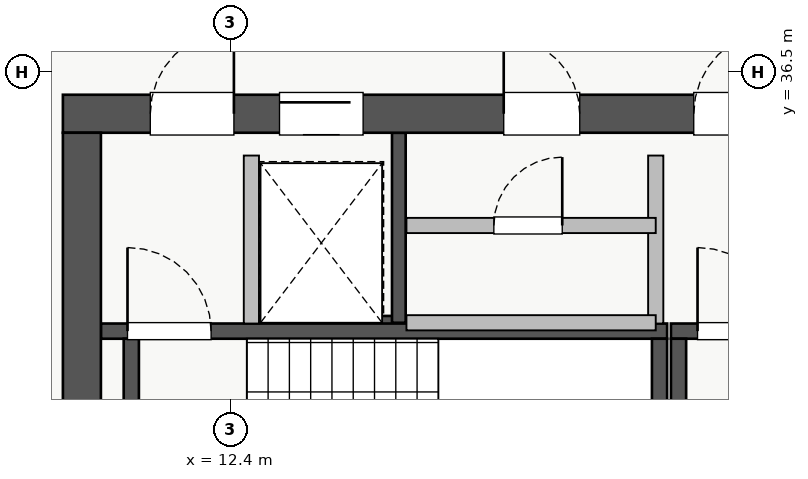
"""IFC4 building model, lengths in metres.
Left out: names, types, materials, properties, quantities, classifications, styles, units other than length and angle.
Written with IfcOpenShell. Run it as: python <this file> out.ifc"""

import sys

from ifc_helpers import new_model, si_unit, direction, frame, frame_2d, origin, place, context, subcontext, project, spatial, rectangle, extrude, source, transform, mapped, element, fill, save


model = new_model("IFC4")
c1 = context("Model", 3, precision=1e-05, world=origin(), true_north=direction((0.0, 1.0)))
c2 = subcontext(c1, "Body", "Model", "MODEL_VIEW")
j1 = project(units=[si_unit("LENGTHUNIT", "METRE"), si_unit("PLANEANGLEUNIT", "RADIAN")], contexts=[c1])
p1 = place(None, origin())
s1 = spatial("IfcSite", under=j1, at=p1, CompositionType="ELEMENT")
p2 = place(p1, origin())
s2 = spatial("IfcBuilding", under=s1, at=p2, CompositionType="ELEMENT")
p3 = place(p2, frame((0.0, 0.0, 240.5)))
s3 = spatial("IfcBuildingStorey", under=s2, at=p3, CompositionType="ELEMENT", Elevation=240.5)
p4 = place(p3, frame((12.68, 33.2, 0.0), z_axis=(0.0, 0.0, 1.0), x_axis=(1.0, 0.0, 0.0)))
e1 = element("IfcWall", 1, at=p4, inside=s3, PredefinedType="SHEAR", context=c2, shape_type="SweptSolid", body=[
    extrude(rectangle(XDim=1.94, YDim=0.18, at=frame_2d((0.97, 0.0))), origin(), (0.0, 0.0, 1.0), 3.07),
])
p5 = place(p3, frame((14.62, 33.2, 0.0), z_axis=(0.0, 0.0, 1.0), x_axis=(0.0, 1.0, 0.0)))
e2 = element("IfcWall", 2, at=p5, inside=s3, PredefinedType="SHEAR", context=c2, shape_type="SweptSolid", body=[
    extrude(rectangle(XDim=2.5, YDim=0.18, at=frame_2d((1.25, 0.0))), origin(), (0.0, 0.0, 1.0), 3.07),
])
p6 = place(p3, frame((10.7, 33.09, 0.0), z_axis=(0.0, 0.0, 1.0), x_axis=(1.0, 0.0, 0.0)))
e3 = element("IfcWall", 3, at=p6, inside=s3, PredefinedType="SHEAR", context=c2, shape_type="SweptSolid", body=[
    extrude(rectangle(XDim=7.45, YDim=0.2, at=frame_2d((3.725, 0.0))), origin(), (0.0, 0.0, 1.0), 3.25),
])
p7 = place(p6, frame((0.35, 0.0, 0.0)))
e4 = element("IfcOpeningElement", 4, at=p7, cuts=e3, PredefinedType="OPENING", context=c2, shape_type="SweptSolid", body=[
    extrude(rectangle(XDim=1.1, YDim=2.05, at=frame_2d((0.55, 1.025))), frame((0.0, 0.11, 0.0), z_axis=(0.0, -1.0, 0.0), x_axis=(1.0, 0.0, 0.0)), (0.0, 0.0, 1.0), 0.22),
])
for number, where, z_axis, x_axis in (
    (5, (11.1, 30.05, 0.0), (0.0, 0.0, 1.0), (0.0, 1.0, 0.0)),
    (6, (18.05, 30.05, 0.0), (0.0, 0.0, 1.0), (0.0, 1.0, 0.0)),
):
    element("IfcWall", number, at=place(p3, frame(where, z_axis=z_axis, x_axis=x_axis)), inside=s3, PredefinedType="SHEAR", context=c2, shape_type="SweptSolid", body=[
        extrude(rectangle(XDim=2.94, YDim=0.2, at=frame_2d((1.47, 0.0))), origin(), (0.0, 0.0, 1.0), 3.25),
    ])
p8 = place(p3, frame((18.2, 33.09, 0.0), z_axis=(0.0, 0.0, 1.0), x_axis=(1.0, 0.0, 0.0)))
e7 = element("IfcWall", 7, at=p8, inside=s3, PredefinedType="SHEAR", context=c2, shape_type="SweptSolid", body=[
    extrude(rectangle(XDim=7.15, YDim=0.2, at=frame_2d((3.575, 0.0))), origin(), (0.0, 0.0, 1.0), 3.25),
])
p9 = place(p8, frame((0.35, 0.0, 0.0)))
e8 = element("IfcOpeningElement", 8, at=p9, cuts=e7, PredefinedType="OPENING", context=c2, shape_type="SweptSolid", body=[
    extrude(rectangle(XDim=1.1, YDim=2.05, at=frame_2d((0.55, 1.025))), frame((0.0, 0.11, 0.0), z_axis=(0.0, -1.0, 0.0), x_axis=(1.0, 0.0, 0.0)), (0.0, 0.0, 1.0), 0.22),
])
p10 = place(p3, frame((18.3, 30.05, 0.0), z_axis=(0.0, 0.0, 1.0), x_axis=(0.0, 1.0, 0.0)))
e9 = element("IfcWall", 9, at=p10, inside=s3, PredefinedType="SHEAR", context=c2, shape_type="SweptSolid", body=[
    extrude(rectangle(XDim=2.94, YDim=0.2, at=frame_2d((1.47, 0.0))), origin(), (0.0, 0.0, 1.0), 3.25),
])
p11 = place(p3, frame((10.2, 35.95, 0.0), z_axis=(0.0, 0.0, 1.0), x_axis=(1.0, 0.0, 0.0)))
e10 = element("IfcWall", 10, at=p11, inside=s3, PredefinedType="SHEAR", context=c2, shape_type="SweptSolid", body=[
    extrude(rectangle(XDim=17.6, YDim=0.5, at=frame_2d((8.8, 0.0))), origin(), (0.0, 0.0, 1.0), 3.25),
])
p12 = place(p11, frame((1.15, 0.0, 0.0)))
e11 = element("IfcOpeningElement", 11, at=p12, cuts=e10, PredefinedType="OPENING", context=c2, shape_type="SweptSolid", body=[
    extrude(rectangle(XDim=1.1, YDim=2.05, at=frame_2d((0.55, 1.025))), frame((0.0, 0.26, 0.0), z_axis=(0.0, -1.0, 0.0), x_axis=(1.0, 0.0, 0.0)), (0.0, 0.0, 1.0), 0.52),
])
p13 = place(p11, frame((8.3, 0.0, 0.0)))
e12 = element("IfcOpeningElement", 12, at=p13, cuts=e10, PredefinedType="OPENING", context=c2, shape_type="SweptSolid", body=[
    extrude(rectangle(XDim=1.1, YDim=2.05, at=frame_2d((0.55, 1.025))), frame((0.0, 0.26, 0.0), z_axis=(0.0, -1.0, 0.0), x_axis=(1.0, 0.0, 0.0)), (0.0, 0.0, 1.0), 0.52),
])
p14 = place(p11, frame((2.85, 0.0, 0.0)))
e13 = element("IfcOpeningElement", 13, at=p14, cuts=e10, PredefinedType="OPENING", context=c2, shape_type="SweptSolid", body=[
    extrude(rectangle(XDim=1.1, YDim=2.05, at=frame_2d((0.55, 1.025))), frame((0.0, 0.26, 0.0), z_axis=(0.0, -1.0, 0.0), x_axis=(1.0, 0.0, 0.0)), (0.0, 0.0, 1.0), 0.52),
])
p15 = place(p11, frame((5.8, 0.0, 0.0)))
e14 = element("IfcOpeningElement", 14, at=p15, cuts=e10, PredefinedType="OPENING", context=c2, shape_type="SweptSolid", body=[
    extrude(rectangle(XDim=1.0, YDim=2.05, at=frame_2d((0.5, 1.025))), frame((0.0, 0.26, 0.0), z_axis=(0.0, -1.0, 0.0), x_axis=(1.0, 0.0, 0.0)), (0.0, 0.0, 1.0), 0.52),
])
p16 = place(p11, frame((14.74, 0.0, 0.0)))
e15 = element("IfcOpeningElement", 15, at=p16, cuts=e10, PredefinedType="OPENING", context=c2, shape_type="SweptSolid", body=[
    extrude(rectangle(XDim=1.0, YDim=2.05, at=frame_2d((0.5, 1.025))), frame((0.0, 0.26, 0.0), z_axis=(0.0, -1.0, 0.0), x_axis=(1.0, 0.0, 0.0)), (0.0, 0.0, 1.0), 0.52),
])
p17 = place(p11, frame((10.25, 0.0, 0.0)))
e16 = element("IfcOpeningElement", 16, at=p17, cuts=e10, PredefinedType="OPENING", context=c2, shape_type="SweptSolid", body=[
    extrude(rectangle(XDim=1.0, YDim=2.05, at=frame_2d((0.5, 1.025))), frame((0.0, 0.26, 0.0), z_axis=(0.0, -1.0, 0.0), x_axis=(1.0, 0.0, 0.0)), (0.0, 0.0, 1.0), 0.52),
])
p18 = place(p11, frame((12.7, 0.0, 0.0)))
e17 = element("IfcOpeningElement", 17, at=p18, cuts=e10, PredefinedType="OPENING", context=c2, shape_type="SweptSolid", body=[
    extrude(rectangle(XDim=1.0, YDim=2.05, at=frame_2d((0.5, 1.025))), frame((0.0, 0.26, 0.0), z_axis=(0.0, -1.0, 0.0), x_axis=(1.0, 0.0, 0.0)), (0.0, 0.0, 1.0), 0.52),
])
p19 = place(p3, frame((10.45, 29.5, 0.0), z_axis=(0.0, 0.0, 1.0), x_axis=(0.0, 1.0, 0.0)))
e18 = element("IfcWall", 18, at=p19, inside=s3, PredefinedType="SHEAR", context=c2, shape_type="SweptSolid", body=[
    extrude(rectangle(XDim=6.2, YDim=0.5, at=frame_2d((3.1, 0.0))), origin(), (0.0, 0.0, 1.0), 3.25),
])
for number, where, z_axis, x_axis in (
    (19, (12.68, 33.19, 0.0), (0.0, 0.0, 1.0), (0.0, 1.0, 0.0)),
    (20, (18.0, 33.19, 0.0), (0.0, 0.0, 1.0), (0.0, 1.0, 0.0)),
):
    element("IfcWall", number, at=place(p3, frame(where, z_axis=z_axis, x_axis=x_axis)), inside=s3, PredefinedType="PARTITIONING", context=c2, shape_type="SweptSolid", body=[
        extrude(rectangle(XDim=2.21, YDim=0.2, at=frame_2d((1.105, 0.0))), origin(), (0.0, 0.0, 1.0), 3.07),
    ])
p20 = place(p3, frame((14.72, 34.48, 0.0), z_axis=(0.0, 0.0, 1.0), x_axis=(1.0, 0.0, 0.0)))
e21 = element("IfcWall", 21, at=p20, inside=s3, PredefinedType="PARTITIONING", context=c2, shape_type="SweptSolid", body=[
    extrude(rectangle(XDim=3.28, YDim=0.2, at=frame_2d((1.64, 0.0))), origin(), (0.0, 0.0, 1.0), 3.07),
])
p21 = place(p20, frame((1.15, 0.0, 0.0)))
e22 = element("IfcOpeningElement", 22, at=p21, cuts=e21, PredefinedType="OPENING", context=c2, shape_type="SweptSolid", body=[
    extrude(rectangle(XDim=0.9, YDim=2.05, at=frame_2d((0.45, 1.025))), frame((0.0, 0.11, 0.0), z_axis=(0.0, -1.0, 0.0), x_axis=(1.0, 0.0, 0.0)), (0.0, 0.0, 1.0), 0.22),
])
p22 = place(p3, frame((14.72, 33.2, 0.0), z_axis=(0.0, 0.0, 1.0), x_axis=(1.0, 0.0, 0.0)))
e23 = element("IfcWall", 23, at=p22, inside=s3, PredefinedType="PARTITIONING", context=c2, shape_type="SweptSolid", body=[
    extrude(rectangle(XDim=3.28, YDim=0.2, at=frame_2d((1.64, 0.0))), origin(), (0.0, 0.0, 1.0), 3.07),
])
m1 = source(origin(), c2, "Body", "SweptSolid", [
    extrude(rectangle(XDim=1.1, YDim=2.05, at=frame_2d((0.55, 1.025))), frame((0.0, 0.025, 0.0), z_axis=(0.0, -1.0, 0.0), x_axis=(1.0, 0.0, 0.0)), (0.0, 0.0, 1.0), 0.05),
])
p23 = place(p12, origin())
e24 = element("IfcDoor", 24, at=p23, inside=s3, OperationType="SINGLE_SWING_RIGHT", PredefinedType="DOOR", context=c2, shape_type="MappedRepresentation", body=[
    mapped(m1, transform((0.0, 0.0, 0.0), x_axis=(1.0, 0.0, 0.0), y_axis=(0.0, 1.0, 0.0), z_axis=(0.0, 0.0, 1.0), scale=1.0)),
])
fill(e11, e24)
p24 = place(p7, origin())
e25 = element("IfcDoor", 25, at=p24, inside=s3, OperationType="SINGLE_SWING_LEFT", PredefinedType="DOOR", context=c2, shape_type="MappedRepresentation", body=[
    mapped(m1, transform((0.0, 0.0, 0.0), x_axis=(1.0, 0.0, 0.0), y_axis=(0.0, 1.0, 0.0), z_axis=(0.0, 0.0, 1.0), scale=1.0)),
])
fill(e4, e25)
p25 = place(p13, origin())
e26 = element("IfcDoor", 26, at=p25, inside=s3, OperationType="SINGLE_SWING_RIGHT", PredefinedType="DOOR", context=c2, shape_type="MappedRepresentation", body=[
    mapped(m1, transform((0.0, 0.0, 0.0), x_axis=(1.0, 0.0, 0.0), y_axis=(0.0, 1.0, 0.0), z_axis=(0.0, 0.0, 1.0), scale=1.0)),
])
fill(e12, e26)
p26 = place(p9, origin())
e27 = element("IfcDoor", 27, at=p26, inside=s3, OperationType="SINGLE_SWING_LEFT", PredefinedType="DOOR", context=c2, shape_type="MappedRepresentation", body=[
    mapped(m1, transform((0.0, 0.0, 0.0), x_axis=(1.0, 0.0, 0.0), y_axis=(0.0, 1.0, 0.0), z_axis=(0.0, 0.0, 1.0), scale=1.0)),
])
fill(e8, e27)
p27 = place(p14, origin())
e28 = element("IfcDoor", 28, at=p27, inside=s3, OperationType="SLIDING_TO_LEFT", PredefinedType="DOOR", context=c2, shape_type="MappedRepresentation", body=[
    mapped(m1, transform((0.0, 0.0, 0.0), x_axis=(1.0, 0.0, 0.0), y_axis=(0.0, 1.0, 0.0), z_axis=(0.0, 0.0, 1.0), scale=1.0)),
])
fill(e13, e28)
m2 = source(origin(), c2, "Body", "SweptSolid", [
    extrude(rectangle(XDim=1.0, YDim=2.05, at=frame_2d((0.5, 1.025))), frame((0.0, 0.025, 0.0), z_axis=(0.0, -1.0, 0.0), x_axis=(1.0, 0.0, 0.0)), (0.0, 0.0, 1.0), 0.05),
])
p28 = place(p15, origin())
e29 = element("IfcDoor", 29, at=p28, inside=s3, OperationType="SINGLE_SWING_LEFT", PredefinedType="DOOR", context=c2, shape_type="MappedRepresentation", body=[
    mapped(m2, transform((0.0, 0.0, 0.0), x_axis=(1.0, 0.0, 0.0), y_axis=(0.0, 1.0, 0.0), z_axis=(0.0, 0.0, 1.0), scale=1.0)),
])
fill(e14, e29)
m3 = source(origin(), c2, "Body", "SweptSolid", [
    extrude(rectangle(XDim=0.9, YDim=2.05, at=frame_2d((0.45, 1.025))), frame((0.0, 0.025, 0.0), z_axis=(0.0, -1.0, 0.0), x_axis=(1.0, 0.0, 0.0)), (0.0, 0.0, 1.0), 0.05),
])
p29 = place(p21, origin())
e30 = element("IfcDoor", 30, at=p29, inside=s3, OperationType="SINGLE_SWING_RIGHT", PredefinedType="DOOR", context=c2, shape_type="MappedRepresentation", body=[
    mapped(m3, transform((0.0, 0.0, 0.0), x_axis=(1.0, 0.0, 0.0), y_axis=(0.0, 1.0, 0.0), z_axis=(0.0, 0.0, 1.0), scale=1.0)),
])
fill(e22, e30)
save(model, sys.argv[1])
